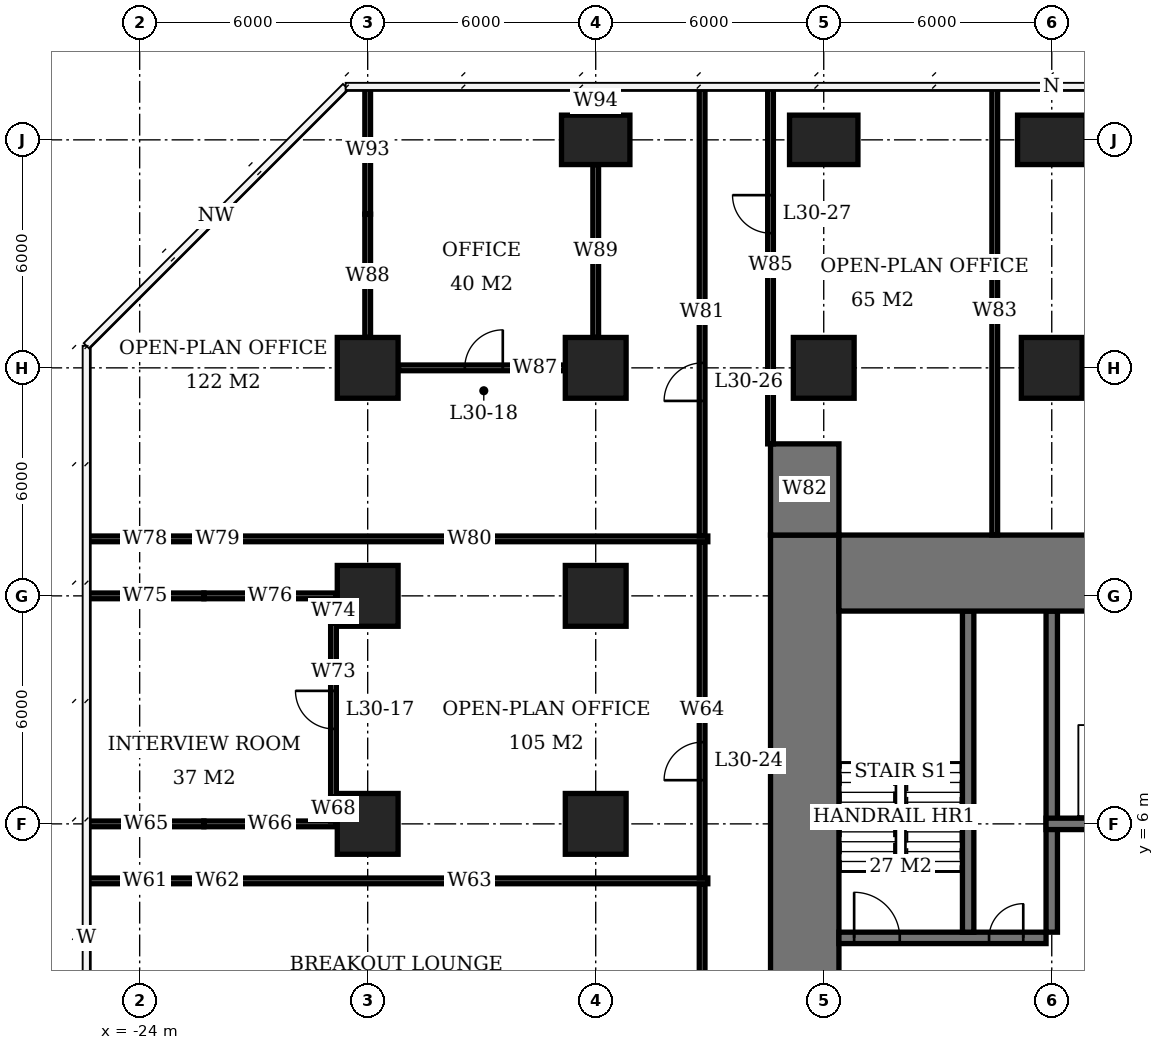
"""IFC4 building model, lengths in metres.
Left out: names, types, materials, properties, quantities, classifications, styles, units other than length and angle.
Written with IfcOpenShell. Run it as: python <this file> out.ifc"""

import sys

from ifc_helpers import new_model, si_unit, direction, frame, frame_2d, origin, origin_2d, place, context, subcontext, project, spatial, rectangle, extrude, element, fill, save


model = new_model("IFC4")
c1 = context("Model", 3, precision=1e-05, world=origin(), true_north=direction((0.0, 1.0)))
c2 = subcontext(c1, "Body", "Model", "MODEL_VIEW")
j1 = project(units=[si_unit("LENGTHUNIT", "METRE"), si_unit("PLANEANGLEUNIT", "RADIAN")], contexts=[c1])
p1 = place(None, origin())
s1 = spatial("IfcSite", under=j1, at=p1, CompositionType="ELEMENT")
p2 = place(p1, origin())
s2 = spatial("IfcBuilding", under=s1, at=p2, CompositionType="ELEMENT")
p3 = place(p2, frame((0.0, 0.0, 125.0)))
s3 = spatial("IfcBuildingStorey", under=s2, at=p3, CompositionType="ELEMENT", Elevation=125.0)
for number, where, z_axis, x_axis in (
    (1, (-18.0, 6.0, 0.0), (0.0, 0.0, 1.0), (1.0, 0.0, 0.0)),
    (2, (-18.0, 12.0, 0.0), (0.0, 0.0, 1.0), (1.0, 0.0, 0.0)),
    (3, (-18.0, 18.0, 0.0), (0.0, 0.0, 1.0), (1.0, 0.0, 0.0)),
    (4, (-12.0, 6.0, 0.0), (0.0, 0.0, 1.0), (1.0, 0.0, 0.0)),
    (5, (-12.0, 12.0, 0.0), (0.0, 0.0, 1.0), (1.0, 0.0, 0.0)),
    (6, (-12.0, 18.0, 0.0), (0.0, 0.0, 1.0), (1.0, 0.0, 0.0)),
):
    element("IfcColumn", number, at=place(p3, frame(where, z_axis=z_axis, x_axis=x_axis)), inside=s3, PredefinedType="COLUMN", context=c2, shape_type="SweptSolid", body=[
        extrude(rectangle(XDim=1.6, YDim=1.6, at=origin_2d()), origin(), (0.0, 0.0, 1.0), 3.9),
    ])
p4 = place(p3, frame((-12.0, 24.0, 0.0), z_axis=(0.0, 0.0, 1.0), x_axis=(1.0, 0.0, 0.0)))
e7 = element("IfcColumn", 7, at=p4, inside=s3, PredefinedType="COLUMN", context=c2, shape_type="SweptSolid", body=[
    extrude(rectangle(XDim=1.8, YDim=1.3, at=origin_2d()), origin(), (0.0, 0.0, 1.0), 3.9),
])
p5 = place(p3, frame((-6.0, 18.0, 0.0), z_axis=(0.0, 0.0, 1.0), x_axis=(1.0, 0.0, 0.0)))
e8 = element("IfcColumn", 8, at=p5, inside=s3, PredefinedType="COLUMN", context=c2, shape_type="SweptSolid", body=[
    extrude(rectangle(XDim=1.6, YDim=1.6, at=origin_2d()), origin(), (0.0, 0.0, 1.0), 3.9),
])
p6 = place(p3, frame((-6.0, 24.0, 0.0), z_axis=(0.0, 0.0, 1.0), x_axis=(1.0, 0.0, 0.0)))
e9 = element("IfcColumn", 9, at=p6, inside=s3, PredefinedType="COLUMN", context=c2, shape_type="SweptSolid", body=[
    extrude(rectangle(XDim=1.8, YDim=1.3, at=origin_2d()), origin(), (0.0, 0.0, 1.0), 3.9),
])
p7 = place(p3, frame((0.0, 18.0, 0.0), z_axis=(0.0, 0.0, 1.0), x_axis=(1.0, 0.0, 0.0)))
e10 = element("IfcColumn", 10, at=p7, inside=s3, PredefinedType="COLUMN", context=c2, shape_type="SweptSolid", body=[
    extrude(rectangle(XDim=1.6, YDim=1.6, at=origin_2d()), origin(), (0.0, 0.0, 1.0), 3.9),
])
p8 = place(p3, frame((0.0, 24.0, 0.0), z_axis=(0.0, 0.0, 1.0), x_axis=(1.0, 0.0, 0.0)))
e11 = element("IfcColumn", 11, at=p8, inside=s3, PredefinedType="COLUMN", context=c2, shape_type="SweptSolid", body=[
    extrude(rectangle(XDim=1.8, YDim=1.3, at=origin_2d()), origin(), (0.0, 0.0, 1.0), 3.9),
])
p9 = place(p3, frame((-5.6, 12.6, 0.0), z_axis=(0.0, 0.0, 1.0), x_axis=(1.0, 0.0, 0.0)))
e12 = element("IfcWall", 12, at=p9, inside=s3, PredefinedType="SHEAR", context=c2, shape_type="SweptSolid", body=[
    extrude(rectangle(XDim=23.2, YDim=2.0, at=frame_2d((11.6, 0.0))), origin(), (0.0, 0.0, 1.0), 3.9),
])
p10 = place(p3, frame((-6.5, -7.6, 0.0), z_axis=(0.0, 0.0, 1.0), x_axis=(0.0, 1.0, 0.0)))
e13 = element("IfcWall", 13, at=p10, inside=s3, PredefinedType="SHEAR", context=c2, shape_type="SweptSolid", body=[
    extrude(rectangle(XDim=21.2, YDim=1.8, at=frame_2d((10.6, 0.0))), origin(), (0.0, 0.0, 1.0), 3.9),
])
p11 = place(p10, frame((7.8, 0.0, 0.0)))
e14 = element("IfcOpeningElement", 14, at=p11, cuts=e13, PredefinedType="OPENING", context=c2, shape_type="SweptSolid", body=[
    extrude(rectangle(XDim=1.8, YDim=2.4, at=frame_2d((0.9, 1.2))), frame((0.0, 0.91, 0.0), z_axis=(0.0, -1.0, 0.0), x_axis=(1.0, 0.0, 0.0)), (0.0, 0.0, 1.0), 1.82),
])
p12 = place(p3, frame((-6.5, 13.6, 0.0), z_axis=(0.0, 0.0, 1.0), x_axis=(0.0, 1.0, 0.0)))
e15 = element("IfcWall", 15, at=p12, inside=s3, PredefinedType="SHEAR", context=c2, shape_type="SweptSolid", body=[
    extrude(rectangle(XDim=2.4, YDim=1.8, at=frame_2d((1.2, 0.0))), origin(), (0.0, 0.0, 1.0), 3.9),
])
p13 = place(p3, frame((-5.6, 3.0, 0.0), z_axis=(0.0, 0.0, 1.0), x_axis=(1.0, 0.0, 0.0)))
e16 = element("IfcWall", 16, at=p13, inside=s3, PredefinedType="SHEAR", context=c2, shape_type="SweptSolid", body=[
    extrude(rectangle(XDim=5.45, YDim=0.3, at=frame_2d((2.725, 0.0))), origin(), (0.0, 0.0, 1.0), 3.9),
])
p14 = place(p13, frame((0.4, 0.0, 0.0)))
e17 = element("IfcOpeningElement", 17, at=p14, cuts=e16, PredefinedType="OPENING", context=c2, shape_type="SweptSolid", body=[
    extrude(rectangle(XDim=1.2, YDim=2.1, at=frame_2d((0.6, 1.05))), frame((0.0, 0.16, 0.0), z_axis=(0.0, -1.0, 0.0), x_axis=(1.0, 0.0, 0.0)), (0.0, 0.0, 1.0), 0.32),
])
p15 = place(p13, frame((3.95, 0.0, 0.0)))
e18 = element("IfcOpeningElement", 18, at=p15, cuts=e16, PredefinedType="OPENING", context=c2, shape_type="SweptSolid", body=[
    extrude(rectangle(XDim=0.9, YDim=2.1, at=frame_2d((0.45, 1.05))), frame((0.0, 0.16, 0.0), z_axis=(0.0, -1.0, 0.0), x_axis=(1.0, 0.0, 0.0)), (0.0, 0.0, 1.0), 0.32),
])
p16 = place(p3, frame((-0.15, 6.0, 0.0), z_axis=(0.0, 0.0, 1.0), x_axis=(1.0, 0.0, 0.0)))
e19 = element("IfcWall", 19, at=p16, inside=s3, PredefinedType="SHEAR", context=c2, shape_type="SweptSolid", body=[
    extrude(rectangle(XDim=17.75, YDim=0.3, at=frame_2d((8.875, 0.0))), origin(), (0.0, 0.0, 1.0), 3.9),
])
p17 = place(p16, frame((13.15, 0.0, 0.0)))
e20 = element("IfcOpeningElement", 20, at=p17, cuts=e19, PredefinedType="OPENING", context=c2, shape_type="SweptSolid", body=[
    extrude(rectangle(XDim=0.9, YDim=2.1, at=frame_2d((0.45, 1.05))), frame((0.0, 0.16, 0.0), z_axis=(0.0, -1.0, 0.0), x_axis=(1.0, 0.0, 0.0)), (0.0, 0.0, 1.0), 0.32),
])
p18 = place(p16, frame((7.25, 0.0, 0.0)))
e21 = element("IfcOpeningElement", 21, at=p18, cuts=e19, PredefinedType="OPENING", context=c2, shape_type="SweptSolid", body=[
    extrude(rectangle(XDim=1.0, YDim=2.1, at=frame_2d((0.5, 1.05))), frame((0.0, 0.16, 0.0), z_axis=(0.0, -1.0, 0.0), x_axis=(1.0, 0.0, 0.0)), (0.0, 0.0, 1.0), 0.32),
])
p19 = place(p16, frame((1.1, 0.0, 0.0)))
e22 = element("IfcOpeningElement", 22, at=p19, cuts=e19, PredefinedType="OPENING", context=c2, shape_type="SweptSolid", body=[
    extrude(rectangle(XDim=1.1, YDim=2.1, at=frame_2d((0.55, 1.05))), frame((0.0, 0.16, 0.0), z_axis=(0.0, -1.0, 0.0), x_axis=(1.0, 0.0, 0.0)), (0.0, 0.0, 1.0), 0.32),
])
p20 = place(p16, frame((4.1, 0.0, 0.0)))
e23 = element("IfcOpeningElement", 23, at=p20, cuts=e19, PredefinedType="OPENING", context=c2, shape_type="SweptSolid", body=[
    extrude(rectangle(XDim=1.1, YDim=2.1, at=frame_2d((0.55, 1.05))), frame((0.0, 0.16, 0.0), z_axis=(0.0, -1.0, 0.0), x_axis=(1.0, 0.0, 0.0)), (0.0, 0.0, 1.0), 0.32),
])
for number, where, z_axis, x_axis in (
    (24, (0.0, 3.15, 0.0), (0.0, 0.0, 1.0), (0.0, 1.0, 0.0)),
    (25, (-2.2, 3.15, 0.0), (0.0, 0.0, 1.0), (0.0, 1.0, 0.0)),
):
    element("IfcWall", number, at=place(p3, frame(where, z_axis=z_axis, x_axis=x_axis)), inside=s3, PredefinedType="SHEAR", context=c2, shape_type="SweptSolid", body=[
        extrude(rectangle(XDim=8.45, YDim=0.3, at=frame_2d((4.225, 0.0))), origin(), (0.0, 0.0, 1.0), 3.9),
    ])
p21 = place(p3, frame((-25.35, 6.0, 0.0), z_axis=(0.0, 0.0, 1.0), x_axis=(1.0, 0.0, 0.0)))
e26 = element("IfcWall", 26, at=p21, inside=s3, PredefinedType="PARTITIONING", context=c2, shape_type="SweptSolid", body=[
    extrude(rectangle(XDim=3.04, YDim=0.15, at=frame_2d((1.52, 0.0))), origin(), (0.0, 0.0, 1.0), 3.65),
])
p22 = place(p3, frame((-22.31, 6.0, 0.0), z_axis=(0.0, 0.0, 1.0), x_axis=(1.0, 0.0, 0.0)))
e27 = element("IfcWall", 27, at=p22, inside=s3, PredefinedType="PARTITIONING", context=c2, shape_type="SweptSolid", body=[
    extrude(rectangle(XDim=3.485, YDim=0.15, at=frame_2d((1.743, 0.0))), origin(), (0.0, 0.0, 1.0), 2.65),
])
p23 = place(p3, frame((-25.4, 12.0, 0.0), z_axis=(0.0, 0.0, 1.0), x_axis=(1.0, 0.0, 0.0)))
e28 = element("IfcWall", 28, at=p23, inside=s3, PredefinedType="PARTITIONING", context=c2, shape_type="SweptSolid", body=[
    extrude(rectangle(XDim=3.09, YDim=0.15, at=frame_2d((1.545, 0.0))), origin(), (0.0, 0.0, 1.0), 3.65),
])
p24 = place(p3, frame((-22.31, 12.0, 0.0), z_axis=(0.0, 0.0, 1.0), x_axis=(1.0, 0.0, 0.0)))
e29 = element("IfcWall", 29, at=p24, inside=s3, PredefinedType="PARTITIONING", context=c2, shape_type="SweptSolid", body=[
    extrude(rectangle(XDim=3.485, YDim=0.15, at=frame_2d((1.743, 0.0))), origin(), (0.0, 0.0, 1.0), 2.65),
])
p25 = place(p3, frame((-17.19, 18.0, 0.0), z_axis=(0.0, 0.0, 1.0), x_axis=(1.0, 0.0, 0.0)))
e30 = element("IfcWall", 30, at=p25, inside=s3, PredefinedType="PARTITIONING", context=c2, shape_type="SweptSolid", body=[
    extrude(rectangle(XDim=4.39, YDim=0.15, at=frame_2d((2.195, 0.0))), origin(), (0.0, 0.0, 1.0), 3.65),
])
p26 = place(p25, frame((1.745, 0.0, 0.0)))
e31 = element("IfcOpeningElement", 31, at=p26, cuts=e30, PredefinedType="OPENING", context=c2, shape_type="SweptSolid", body=[
    extrude(rectangle(XDim=1.0, YDim=2.1, at=frame_2d((0.5, 1.05))), frame((0.0, 0.085, 0.0), z_axis=(0.0, -1.0, 0.0), x_axis=(1.0, 0.0, 0.0)), (0.0, 0.0, 1.0), 0.17),
])
p27 = place(p3, frame((-18.9, 6.075, 0.0), z_axis=(0.0, 0.0, 1.0), x_axis=(0.0, 1.0, 0.0)))
e32 = element("IfcWall", 32, at=p27, inside=s3, PredefinedType="PARTITIONING", context=c2, shape_type="SweptSolid", body=[
    extrude(rectangle(XDim=0.635, YDim=0.15, at=frame_2d((0.317, 0.0))), origin(), (0.0, 0.0, 1.0), 2.65),
])
p28 = place(p3, frame((-18.9, 6.71, 0.0), z_axis=(0.0, 0.0, 1.0), x_axis=(0.0, 1.0, 0.0)))
e33 = element("IfcWall", 33, at=p28, inside=s3, PredefinedType="PARTITIONING", context=c2, shape_type="SweptSolid", body=[
    extrude(rectangle(XDim=4.58, YDim=0.15, at=frame_2d((2.29, 0.0))), origin(), (0.0, 0.0, 1.0), 3.65),
])
p29 = place(p28, frame((1.79, 0.0, 0.0)))
e34 = element("IfcOpeningElement", 34, at=p29, cuts=e33, PredefinedType="OPENING", context=c2, shape_type="SweptSolid", body=[
    extrude(rectangle(XDim=1.0, YDim=2.1, at=frame_2d((0.5, 1.05))), frame((0.0, 0.085, 0.0), z_axis=(0.0, -1.0, 0.0), x_axis=(1.0, 0.0, 0.0)), (0.0, 0.0, 1.0), 0.17),
])
p30 = place(p3, frame((-18.9, 11.29, 0.0), z_axis=(0.0, 0.0, 1.0), x_axis=(0.0, 1.0, 0.0)))
e35 = element("IfcWall", 35, at=p30, inside=s3, PredefinedType="PARTITIONING", context=c2, shape_type="SweptSolid", body=[
    extrude(rectangle(XDim=0.635, YDim=0.15, at=frame_2d((0.317, 0.0))), origin(), (0.0, 0.0, 1.0), 2.65),
])
p31 = place(p3, frame((-18.0, 18.8, 0.0), z_axis=(0.0, 0.0, 1.0), x_axis=(0.0, 1.0, 0.0)))
e36 = element("IfcWall", 36, at=p31, inside=s3, PredefinedType="PARTITIONING", context=c2, shape_type="SweptSolid", body=[
    extrude(rectangle(XDim=3.245, YDim=0.15, at=frame_2d((1.623, 0.0))), origin(), (0.0, 0.0, 1.0), 2.65),
])
p32 = place(p3, frame((-18.0, 22.045, 0.0), z_axis=(0.0, 0.0, 1.0), x_axis=(0.0, 1.0, 0.0)))
e37 = element("IfcWall", 37, at=p32, inside=s3, PredefinedType="PARTITIONING", context=c2, shape_type="SweptSolid", body=[
    extrude(rectangle(XDim=3.355, YDim=0.15, at=frame_2d((1.677, 0.0))), origin(), (0.0, 0.0, 1.0), 3.65),
])
p33 = place(p3, frame((-12.0, 18.8, 0.0), z_axis=(0.0, 0.0, 1.0), x_axis=(0.0, 1.0, 0.0)))
e38 = element("IfcWall", 38, at=p33, inside=s3, PredefinedType="PARTITIONING", context=c2, shape_type="SweptSolid", body=[
    extrude(rectangle(XDim=4.55, YDim=0.15, at=frame_2d((2.275, 0.0))), origin(), (0.0, 0.0, 1.0), 3.65),
])
p34 = place(p3, frame((-12.0, 24.65, 0.0), z_axis=(0.0, 0.0, 1.0), x_axis=(0.0, 1.0, 0.0)))
e39 = element("IfcWall", 39, at=p34, inside=s3, PredefinedType="PARTITIONING", context=c2, shape_type="SweptSolid", body=[
    extrude(rectangle(XDim=0.75, YDim=0.15, at=frame_2d((0.375, 0.0))), origin(), (0.0, 0.0, 1.0), 3.65),
])
p35 = place(p3, frame((-25.4, 4.5, 0.0), z_axis=(0.0, 0.0, 1.0), x_axis=(1.0, 0.0, 0.0)))
e40 = element("IfcWall", 40, at=p35, inside=s3, PredefinedType="PARTITIONING", context=c2, shape_type="SweptSolid", body=[
    extrude(rectangle(XDim=3.09, YDim=0.15, at=frame_2d((1.545, 0.0))), origin(), (0.0, 0.0, 1.0), 3.65),
])
p36 = place(p3, frame((-22.31, 4.5, 0.0), z_axis=(0.0, 0.0, 1.0), x_axis=(1.0, 0.0, 0.0)))
e41 = element("IfcWall", 41, at=p36, inside=s3, PredefinedType="PARTITIONING", context=c2, shape_type="SweptSolid", body=[
    extrude(rectangle(XDim=0.72, YDim=0.15, at=frame_2d((0.36, 0.0))), origin(), (0.0, 0.0, 1.0), 2.65),
])
p37 = place(p3, frame((-21.59, 4.5, 0.0), z_axis=(0.0, 0.0, 1.0), x_axis=(1.0, 0.0, 0.0)))
e42 = element("IfcWall", 42, at=p37, inside=s3, PredefinedType="PARTITIONING", context=c2, shape_type="SweptSolid", body=[
    extrude(rectangle(XDim=12.54, YDim=0.15, at=frame_2d((6.27, 0.0))), origin(), (0.0, 0.0, 1.0), 3.65),
])
p38 = place(p3, frame((-25.4, 13.5, 0.0), z_axis=(0.0, 0.0, 1.0), x_axis=(1.0, 0.0, 0.0)))
e43 = element("IfcWall", 43, at=p38, inside=s3, PredefinedType="PARTITIONING", context=c2, shape_type="SweptSolid", body=[
    extrude(rectangle(XDim=3.09, YDim=0.15, at=frame_2d((1.545, 0.0))), origin(), (0.0, 0.0, 1.0), 3.65),
])
p39 = place(p3, frame((-22.31, 13.5, 0.0), z_axis=(0.0, 0.0, 1.0), x_axis=(1.0, 0.0, 0.0)))
e44 = element("IfcWall", 44, at=p39, inside=s3, PredefinedType="PARTITIONING", context=c2, shape_type="SweptSolid", body=[
    extrude(rectangle(XDim=0.72, YDim=0.15, at=frame_2d((0.36, 0.0))), origin(), (0.0, 0.0, 1.0), 2.65),
])
p40 = place(p3, frame((-21.59, 13.5, 0.0), z_axis=(0.0, 0.0, 1.0), x_axis=(1.0, 0.0, 0.0)))
e45 = element("IfcWall", 45, at=p40, inside=s3, PredefinedType="PARTITIONING", context=c2, shape_type="SweptSolid", body=[
    extrude(rectangle(XDim=12.54, YDim=0.15, at=frame_2d((6.27, 0.0))), origin(), (0.0, 0.0, 1.0), 3.65),
])
p41 = place(p3, frame((-9.2, -1.05, 0.0), z_axis=(0.0, 0.0, 1.0), x_axis=(0.0, 1.0, 0.0)))
e46 = element("IfcWall", 46, at=p41, inside=s3, PredefinedType="PARTITIONING", context=c2, shape_type="SweptSolid", body=[
    extrude(rectangle(XDim=5.475, YDim=0.15, at=frame_2d((2.738, 0.0))), origin(), (0.0, 0.0, 1.0), 3.65),
])
p42 = place(p3, frame((-9.2, 4.575, 0.0), z_axis=(0.0, 0.0, 1.0), x_axis=(0.0, 1.0, 0.0)))
e47 = element("IfcWall", 47, at=p42, inside=s3, PredefinedType="PARTITIONING", context=c2, shape_type="SweptSolid", body=[
    extrude(rectangle(XDim=8.85, YDim=0.15, at=frame_2d((4.425, 0.0))), origin(), (0.0, 0.0, 1.0), 3.65),
])
p43 = place(p42, frame((2.575, 0.0, 0.0)))
e48 = element("IfcOpeningElement", 48, at=p43, cuts=e47, PredefinedType="OPENING", context=c2, shape_type="SweptSolid", body=[
    extrude(rectangle(XDim=1.0, YDim=2.1, at=frame_2d((0.5, 1.05))), frame((0.0, 0.085, 0.0), z_axis=(0.0, -1.0, 0.0), x_axis=(1.0, 0.0, 0.0)), (0.0, 0.0, 1.0), 0.17),
])
p44 = place(p3, frame((-9.2, 13.575, 0.0), z_axis=(0.0, 0.0, 1.0), x_axis=(0.0, 1.0, 0.0)))
e49 = element("IfcWall", 49, at=p44, inside=s3, PredefinedType="PARTITIONING", context=c2, shape_type="SweptSolid", body=[
    extrude(rectangle(XDim=11.775, YDim=0.15, at=frame_2d((5.888, 0.0))), origin(), (0.0, 0.0, 1.0), 3.65),
])
p45 = place(p44, frame((3.555, 0.0, 0.0)))
e50 = element("IfcOpeningElement", 50, at=p45, cuts=e49, PredefinedType="OPENING", context=c2, shape_type="SweptSolid", body=[
    extrude(rectangle(XDim=1.0, YDim=2.1, at=frame_2d((0.5, 1.05))), frame((0.0, 0.085, 0.0), z_axis=(0.0, -1.0, 0.0), x_axis=(1.0, 0.0, 0.0)), (0.0, 0.0, 1.0), 0.17),
])
p46 = place(p3, frame((-7.4, 16.0, 0.0), z_axis=(0.0, 0.0, 1.0), x_axis=(0.0, 1.0, 0.0)))
e51 = element("IfcWall", 51, at=p46, inside=s3, PredefinedType="PARTITIONING", context=c2, shape_type="SweptSolid", body=[
    extrude(rectangle(XDim=9.4, YDim=0.15, at=frame_2d((4.7, 0.0))), origin(), (0.0, 0.0, 1.0), 3.65),
])
p47 = place(p46, frame((5.545, 0.0, 0.0)))
e52 = element("IfcOpeningElement", 52, at=p47, cuts=e51, PredefinedType="OPENING", context=c2, shape_type="SweptSolid", body=[
    extrude(rectangle(XDim=1.0, YDim=2.1, at=frame_2d((0.5, 1.05))), frame((0.0, 0.085, 0.0), z_axis=(0.0, -1.0, 0.0), x_axis=(1.0, 0.0, 0.0)), (0.0, 0.0, 1.0), 0.17),
])
p48 = place(p3, frame((-1.5, 13.6, 0.0), z_axis=(0.0, 0.0, 1.0), x_axis=(0.0, 1.0, 0.0)))
e53 = element("IfcWall", 53, at=p48, inside=s3, PredefinedType="PARTITIONING", context=c2, shape_type="SweptSolid", body=[
    extrude(rectangle(XDim=11.8, YDim=0.15, at=frame_2d((5.9, 0.0))), origin(), (0.0, 0.0, 1.0), 3.65),
])
p49 = place(p14, origin())
e54 = element("IfcDoor", 54, at=p49, inside=s3, OperationType="SINGLE_SWING_LEFT", PredefinedType="DOOR", context=c2, shape_type="SweptSolid", body=[
    extrude(rectangle(XDim=1.2, YDim=2.1, at=frame_2d((0.6, 1.05))), frame((0.0, 0.025, 0.0), z_axis=(0.0, -1.0, 0.0), x_axis=(1.0, 0.0, 0.0)), (0.0, 0.0, 1.0), 0.05),
])
fill(e17, e54)
p50 = place(p15, origin())
e55 = element("IfcDoor", 55, at=p50, inside=s3, OperationType="SINGLE_SWING_RIGHT", PredefinedType="DOOR", context=c2, shape_type="SweptSolid", body=[
    extrude(rectangle(XDim=0.9, YDim=2.1, at=frame_2d((0.45, 1.05))), frame((0.0, 0.025, 0.0), z_axis=(0.0, -1.0, 0.0), x_axis=(1.0, 0.0, 0.0)), (0.0, 0.0, 1.0), 0.05),
])
fill(e18, e55)
p51 = place(p29, origin())
e56 = element("IfcDoor", 56, at=p51, inside=s3, OperationType="SINGLE_SWING_RIGHT", PredefinedType="DOOR", context=c2, shape_type="SweptSolid", body=[
    extrude(rectangle(XDim=1.0, YDim=2.1, at=frame_2d((0.5, 1.05))), frame((0.0, 0.025, 0.0), z_axis=(0.0, -1.0, 0.0), x_axis=(1.0, 0.0, 0.0)), (0.0, 0.0, 1.0), 0.05),
])
fill(e34, e56)
p52 = place(p26, origin())
e57 = element("IfcDoor", 57, at=p52, inside=s3, OperationType="SINGLE_SWING_RIGHT", PredefinedType="DOOR", context=c2, shape_type="SweptSolid", body=[
    extrude(rectangle(XDim=1.0, YDim=2.1, at=frame_2d((0.5, 1.05))), frame((0.0, 0.025, 0.0), z_axis=(0.0, -1.0, 0.0), x_axis=(1.0, 0.0, 0.0)), (0.0, 0.0, 1.0), 0.05),
])
fill(e31, e57)
p53 = place(p43, origin())
e58 = element("IfcDoor", 58, at=p53, inside=s3, OperationType="SINGLE_SWING_LEFT", PredefinedType="DOOR", context=c2, shape_type="SweptSolid", body=[
    extrude(rectangle(XDim=1.0, YDim=2.1, at=frame_2d((0.5, 1.05))), frame((0.0, 0.025, 0.0), z_axis=(0.0, -1.0, 0.0), x_axis=(1.0, 0.0, 0.0)), (0.0, 0.0, 1.0), 0.05),
])
fill(e48, e58)
p54 = place(p45, origin())
e59 = element("IfcDoor", 59, at=p54, inside=s3, OperationType="SINGLE_SWING_LEFT", PredefinedType="DOOR", context=c2, shape_type="SweptSolid", body=[
    extrude(rectangle(XDim=1.0, YDim=2.1, at=frame_2d((0.5, 1.05))), frame((0.0, 0.025, 0.0), z_axis=(0.0, -1.0, 0.0), x_axis=(1.0, 0.0, 0.0)), (0.0, 0.0, 1.0), 0.05),
])
fill(e50, e59)
p55 = place(p47, origin())
e60 = element("IfcDoor", 60, at=p55, inside=s3, OperationType="SINGLE_SWING_RIGHT", PredefinedType="DOOR", context=c2, shape_type="SweptSolid", body=[
    extrude(rectangle(XDim=1.0, YDim=2.1, at=frame_2d((0.5, 1.05))), frame((0.0, 0.025, 0.0), z_axis=(0.0, -1.0, 0.0), x_axis=(1.0, 0.0, 0.0)), (0.0, 0.0, 1.0), 0.05),
])
fill(e52, e60)
save(model, sys.argv[1])
